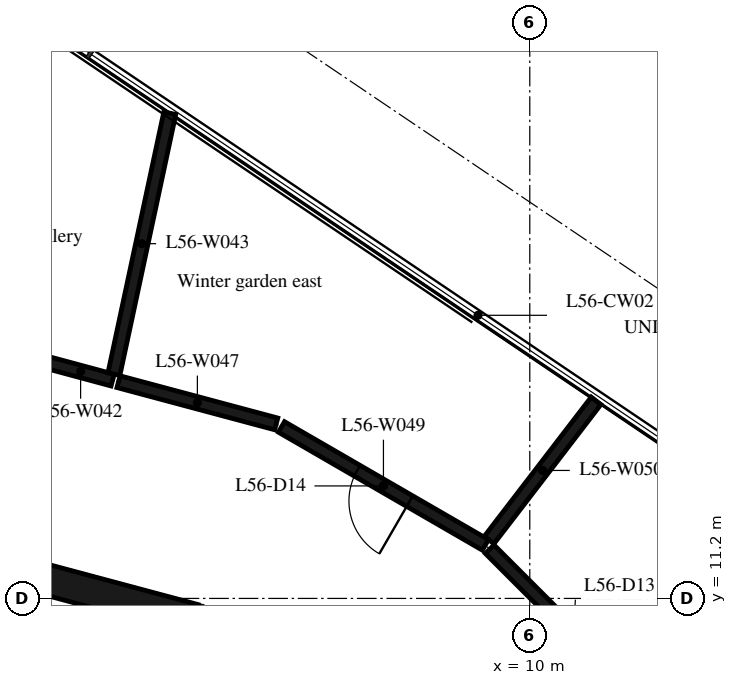
"""IFC4 building model, lengths in metres.
Left out: names, types, materials, properties, quantities, classifications, styles, units other than length and angle.
Written with IfcOpenShell. Run it as: python <this file> out.ifc"""

import sys

from ifc_helpers import new_model, si_unit, direction, frame, frame_2d, origin, place, context, subcontext, project, spatial, rectangle, extrude, element, fill, save


model = new_model("IFC4")
c1 = context("Model", 3, precision=1e-05, world=origin(), true_north=direction((0.0, 1.0)))
c2 = subcontext(c1, "Body", "Model", "MODEL_VIEW")
j1 = project(units=[si_unit("LENGTHUNIT", "METRE"), si_unit("PLANEANGLEUNIT", "RADIAN")], contexts=[c1])
p1 = place(None, origin())
s1 = spatial("IfcSite", under=j1, at=p1, CompositionType="ELEMENT")
p2 = place(p1, origin())
s2 = spatial("IfcBuilding", under=s1, at=p2, CompositionType="ELEMENT")
p3 = place(p2, frame((0.0, 0.0, 219.9)))
s3 = spatial("IfcBuildingStorey", under=s2, at=p3, CompositionType="ELEMENT", Elevation=219.9)
p4 = place(p3, frame((4.479, 10.858, 0.0), z_axis=(0.0, 0.0, 1.0), x_axis=(-0.965948410781, 0.258734743916, 0.0)))
e1 = element("IfcWall", 1, at=p4, inside=s3, PredefinedType="SHEAR", context=c2, shape_type="SweptSolid", body=[
    extrude(rectangle(XDim=3.033, YDim=0.5, at=frame_2d((1.516, 0.0))), origin(), (0.0, 0.0, 1.0), 6.35),
])
p5 = place(p3, frame((3.14, 14.79, 0.0), z_axis=(0.0, 0.0, 1.0), x_axis=(-0.965529267024, 0.260294514963, 0.0)))
e2 = element("IfcWall", 2, at=p5, inside=s3, PredefinedType="PARTITIONING", context=c2, shape_type="SweptSolid", body=[
    extrude(rectangle(XDim=1.091, YDim=0.2, at=frame_2d((0.545, 0.0))), origin(), (0.0, 0.0, 1.0), 6.35),
])
p6 = place(p3, frame((3.161, 14.888, 0.0), z_axis=(0.0, 0.0, 1.0), x_axis=(0.209403741848, 0.977829265721, 0.0)))
e3 = element("IfcWall", 3, at=p6, inside=s3, PredefinedType="PARTITIONING", context=c2, shape_type="SweptSolid", body=[
    extrude(rectangle(XDim=4.39, YDim=0.2, at=frame_2d((2.195, 0.0))), origin(), (0.0, 0.0, 1.0), 6.35),
])
p7 = place(p3, frame((5.83, 14.07, 0.0), z_axis=(0.0, 0.0, 1.0), x_axis=(-0.966003629213, 0.25852850587, 0.0)))
e4 = element("IfcWall", 4, at=p7, inside=s3, PredefinedType="PARTITIONING", context=c2, shape_type="SweptSolid", body=[
    extrude(rectangle(XDim=2.685, YDim=0.2, at=frame_2d((1.342, 0.0))), origin(), (0.0, 0.0, 1.0), 6.35),
])
p8 = place(p3, frame((9.27, 12.08, 0.0), z_axis=(0.0, 0.0, 1.0), x_axis=(-0.865601686425, 0.500733182901, 0.0)))
e5 = element("IfcWall", 5, at=p8, inside=s3, PredefinedType="PARTITIONING", context=c2, shape_type="SweptSolid", body=[
    extrude(rectangle(XDim=3.874, YDim=0.2, at=frame_2d((1.937, 0.0))), origin(), (0.0, 0.0, 1.0), 6.35),
])
p9 = place(p8, frame((1.437, 0.0, 0.0)))
e6 = element("IfcOpeningElement", 6, at=p9, cuts=e5, PredefinedType="OPENING", context=c2, shape_type="SweptSolid", body=[
    extrude(rectangle(XDim=1.0, YDim=2.1, at=frame_2d((0.5, 1.05))), frame((0.0, 0.11, 0.0), z_axis=(0.0, -1.0, 0.0), x_axis=(1.0, 0.0, 0.0)), (0.0, 0.0, 1.0), 0.22),
])
p10 = place(p3, frame((9.331, 12.159, 0.0), z_axis=(0.0, 0.0, 1.0), x_axis=(0.609130507388, 0.793070000044, 0.0)))
e7 = element("IfcWall", 7, at=p10, inside=s3, PredefinedType="PARTITIONING", context=c2, shape_type="SweptSolid", body=[
    extrude(rectangle(XDim=2.888, YDim=0.2, at=frame_2d((1.444, 0.0))), origin(), (0.0, 0.0, 1.0), 6.35),
])
p11 = place(p3, frame((12.08, 9.27, 0.0), z_axis=(0.0, 0.0, 1.0), x_axis=(-0.707106781187, 0.707106781187, 0.0)))
e8 = element("IfcWall", 8, at=p11, inside=s3, PredefinedType="PARTITIONING", context=c2, shape_type="SweptSolid", body=[
    extrude(rectangle(XDim=3.874, YDim=0.2, at=frame_2d((1.937, 0.0))), origin(), (0.0, 0.0, 1.0), 6.35),
])
p12 = place(p11, frame((1.437, 0.0, 0.0)))
e9 = element("IfcOpeningElement", 9, at=p12, cuts=e8, PredefinedType="OPENING", context=c2, shape_type="SweptSolid", body=[
    extrude(rectangle(XDim=1.0, YDim=2.1, at=frame_2d((0.5, 1.05))), frame((0.0, 0.11, 0.0), z_axis=(0.0, -1.0, 0.0), x_axis=(1.0, 0.0, 0.0)), (0.0, 0.0, 1.0), 0.22),
])
p13 = place(p9, origin())
e10 = element("IfcDoor", 10, at=p13, inside=s3, OperationType="SINGLE_SWING_LEFT", PredefinedType="DOOR", context=c2, shape_type="SweptSolid", body=[
    extrude(rectangle(XDim=1.0, YDim=2.1, at=frame_2d((0.5, 1.05))), frame((0.0, 0.025, 0.0), z_axis=(0.0, -1.0, 0.0), x_axis=(1.0, 0.0, 0.0)), (0.0, 0.0, 1.0), 0.05),
])
fill(e6, e10)
save(model, sys.argv[1])
